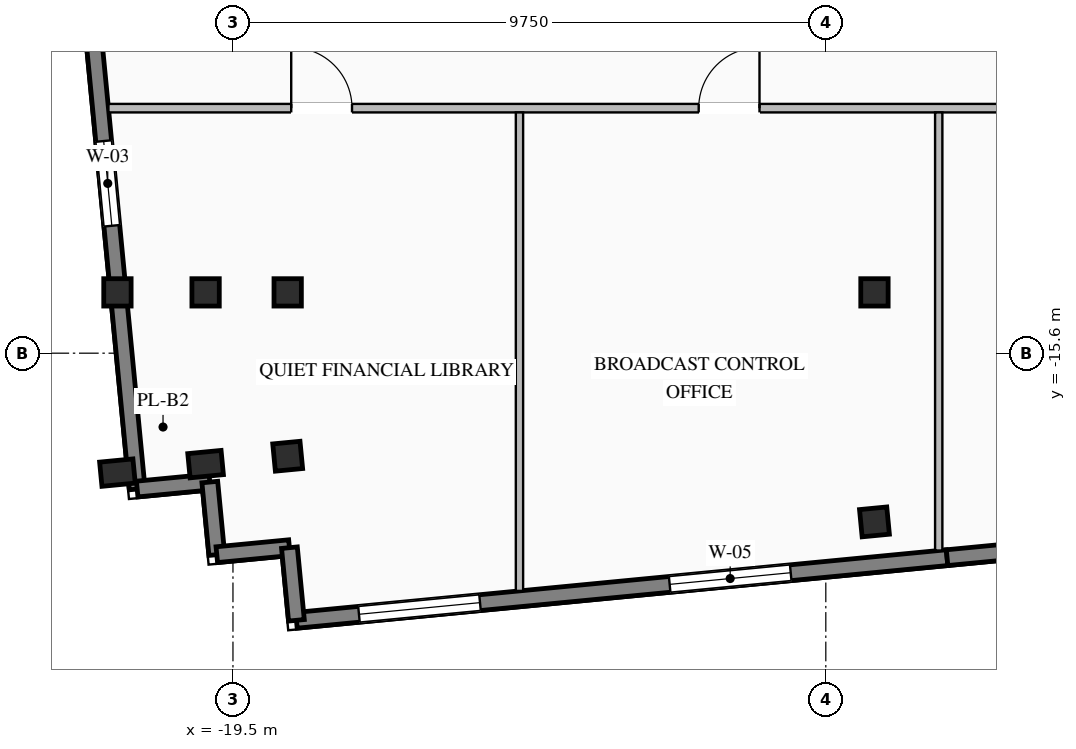
"""IFC4 building model, lengths in metres.
Left out: names, types, materials, properties, quantities, classifications, styles, units other than length and angle.
Written with IfcOpenShell. Run it as: python <this file> out.ifc"""

import sys

from ifc_helpers import new_model, si_unit, direction, frame, frame_2d, origin, origin_2d, place, context, subcontext, project, spatial, rectangle, i_section, extrude, element, fill, save


model = new_model("IFC4")
c1 = context("Model", 3, precision=1e-05, world=origin(), true_north=direction((0.0, 1.0)))
c2 = subcontext(c1, "Body", "Model", "MODEL_VIEW")
j1 = project(units=[si_unit("LENGTHUNIT", "METRE"), si_unit("PLANEANGLEUNIT", "RADIAN")], contexts=[c1])
p1 = place(None, origin())
s1 = spatial("IfcSite", under=j1, at=p1, CompositionType="ELEMENT")
p2 = place(p1, origin())
s2 = spatial("IfcBuilding", under=s1, at=p2, CompositionType="ELEMENT")
p3 = place(p2, frame((0.0, 0.0, 279.3)))
s3 = spatial("IfcBuildingStorey", under=s2, at=p3, CompositionType="ELEMENT", Elevation=279.3)
for number, where, z_axis, x_axis in (
    (1, (-21.4, -14.6, 0.0), (0.0, 0.0, 1.0), (1.0, 0.0, 0.0)),
    (2, (-19.95, -14.6, 0.0), (0.0, 0.0, 1.0), (1.0, 0.0, 0.0)),
    (3, (-18.6, -14.6, 0.0), (0.0, 0.0, 1.0), (1.0, 0.0, 0.0)),
    (4, (-8.95, -14.6, 0.0), (0.0, 0.0, 1.0), (1.0, 0.0, 0.0)),
    (5, (-18.6, -17.295, 0.0), (0.0, 0.0, 1.0), (0.995, 0.096, 0.0)),
    (6, (-8.95, -18.375, 0.0), (0.0, 0.0, 1.0), (0.995, 0.096, 0.0)),
):
    element("IfcColumn", number, at=place(p3, frame(where, z_axis=z_axis, x_axis=x_axis)), inside=s3, PredefinedType="COLUMN", context=c2, shape_type="SweptSolid", body=[
        extrude(i_section(OverallWidth=0.45, OverallDepth=0.45, WebThickness=0.022, FlangeThickness=0.032, at=origin_2d()), origin(), (0.0, 0.0, 1.0), 3.45),
    ])
for number, where, z_axis, x_axis in (
    (7, (-21.4, -17.564, 0.0), (0.0, 0.0, 1.0), (0.995, 0.096, 0.0)),
    (8, (-19.95, -17.425, 0.0), (0.0, 0.0, 1.0), (0.995, 0.096, 0.0)),
):
    element("IfcColumn", number, at=place(p3, frame(where, z_axis=z_axis, x_axis=x_axis)), inside=s3, PredefinedType="PILASTER", context=c2, shape_type="SweptSolid", body=[
        extrude(rectangle(XDim=0.55, YDim=0.4, at=origin_2d()), origin(), (0.0, 0.0, 1.0), 3.45),
    ])
p4 = place(p3, frame((-7.756, -18.963, 0.0), z_axis=(0.0, 0.0, 1.0), x_axis=(-0.995396745868, -0.095840066339, 0.0)))
e9 = element("IfcWall", 9, at=p4, inside=s3, PredefinedType="STANDARD", context=c2, shape_type="SweptSolid", body=[
    extrude(rectangle(XDim=10.75, YDim=0.26, at=frame_2d((5.375, 0.0))), origin(), (0.0, 0.0, 1.0), 3.25),
])
p5 = place(p4, frame((2.583, 0.0, 0.76)))
e10 = element("IfcOpeningElement", 10, at=p5, cuts=e9, PredefinedType="OPENING", context=c2, shape_type="SweptSolid", body=[
    extrude(rectangle(XDim=2.0, YDim=2.05, at=frame_2d((1.0, 1.025))), frame((0.0, 0.14, 0.0), z_axis=(0.0, -1.0, 0.0), x_axis=(1.0, 0.0, 0.0)), (0.0, 0.0, 1.0), 0.28),
])
p6 = place(p4, frame((7.717, 0.0, 0.76)))
e11 = element("IfcOpeningElement", 11, at=p6, cuts=e9, PredefinedType="OPENING", context=c2, shape_type="SweptSolid", body=[
    extrude(rectangle(XDim=2.0, YDim=2.05, at=frame_2d((1.0, 1.025))), frame((0.0, 0.14, 0.0), z_axis=(0.0, -1.0, 0.0), x_axis=(1.0, 0.0, 0.0)), (0.0, 0.0, 1.0), 0.28),
])
p7 = place(p3, frame((1.203, -18.101, 0.0), z_axis=(0.0, 0.0, 1.0), x_axis=(-0.995397043619, -0.095836973841, 0.0)))
e12 = element("IfcWall", 12, at=p7, inside=s3, PredefinedType="STANDARD", context=c2, shape_type="SweptSolid", body=[
    extrude(rectangle(XDim=9.0, YDim=0.26, at=frame_2d((4.5, 0.0))), origin(), (0.0, 0.0, 1.0), 3.25),
])
p8 = place(p7, frame((2.0, 0.0, 0.76)))
e13 = element("IfcOpeningElement", 13, at=p8, cuts=e12, PredefinedType="OPENING", context=c2, shape_type="SweptSolid", body=[
    extrude(rectangle(XDim=2.0, YDim=2.05, at=frame_2d((1.0, 1.025))), frame((0.0, 0.14, 0.0), z_axis=(0.0, -1.0, 0.0), x_axis=(1.0, 0.0, 0.0)), (0.0, 0.0, 1.0), 0.28),
])
p9 = place(p7, frame((5.0, 0.0, 0.76)))
e14 = element("IfcOpeningElement", 14, at=p9, cuts=e12, PredefinedType="OPENING", context=c2, shape_type="SweptSolid", body=[
    extrude(rectangle(XDim=2.0, YDim=2.05, at=frame_2d((1.0, 1.025))), frame((0.0, 0.14, 0.0), z_axis=(0.0, -1.0, 0.0), x_axis=(1.0, 0.0, 0.0)), (0.0, 0.0, 1.0), 0.28),
])
p10 = place(p3, frame((-21.075, -17.834, 0.0), z_axis=(0.0, 0.0, 1.0), x_axis=(-0.095852427869, 0.995395555582, 0.0)))
e15 = element("IfcWall", 15, at=p10, inside=s3, PredefinedType="STANDARD", context=c2, shape_type="SweptSolid", body=[
    extrude(rectangle(XDim=15.15, YDim=0.26, at=frame_2d((7.575, 0.0))), origin(), (0.0, 0.0, 1.0), 2.645),
])
p11 = place(p10, frame((4.35, 0.0, 0.535)))
e16 = element("IfcOpeningElement", 16, at=p11, cuts=e15, PredefinedType="OPENING", context=c2, shape_type="SweptSolid", body=[
    extrude(rectangle(XDim=1.4, YDim=1.95, at=frame_2d((0.7, 0.975))), frame((0.0, 0.14, 0.0), z_axis=(0.0, -1.0, 0.0), x_axis=(1.0, 0.0, 0.0)), (0.0, 0.0, 1.0), 0.28),
])
p12 = place(p10, frame((9.4, 0.0, 0.535)))
e17 = element("IfcOpeningElement", 17, at=p12, cuts=e15, PredefinedType="OPENING", context=c2, shape_type="SweptSolid", body=[
    extrude(rectangle(XDim=1.4, YDim=1.95, at=frame_2d((0.7, 0.975))), frame((0.0, 0.14, 0.0), z_axis=(0.0, -1.0, 0.0), x_axis=(1.0, 0.0, 0.0)), (0.0, 0.0, 1.0), 0.28),
])
p13 = place(p3, frame((-21.075, -17.834, 0.0), z_axis=(0.0, 0.0, 1.0), x_axis=(0.995397091755, 0.095836473879, 0.0)))
e18 = element("IfcWall", 18, at=p13, inside=s3, PredefinedType="STANDARD", context=c2, shape_type="SweptSolid", body=[
    extrude(rectangle(XDim=1.2, YDim=0.26, at=frame_2d((0.6, 0.0))), origin(), (0.0, 0.0, 1.0), 2.645),
])
for number, where, z_axis, x_axis in (
    (19, (-19.881, -17.719, 0.0), (0.0, 0.0, 1.0), (0.096, -0.995, 0.0)),
    (20, (-19.766, -18.914, 0.0), (0.0, 0.0, 1.0), (0.995, 0.096, 0.0)),
):
    element("IfcWall", number, at=place(p3, frame(where, z_axis=z_axis, x_axis=x_axis)), inside=s3, PredefinedType="STANDARD", context=c2, shape_type="SweptSolid", body=[
        extrude(rectangle(XDim=1.2, YDim=0.26, at=frame_2d((0.6, 0.0))), origin(), (0.0, 0.0, 1.0), 2.645),
    ])
p14 = place(p3, frame((-18.571, -18.799, 0.0), z_axis=(0.0, 0.0, 1.0), x_axis=(0.095836473879, -0.995397091755, 0.0)))
e21 = element("IfcWall", 21, at=p14, inside=s3, PredefinedType="STANDARD", context=c2, shape_type="SweptSolid", body=[
    extrude(rectangle(XDim=1.2, YDim=0.26, at=frame_2d((0.6, 0.0))), origin(), (0.0, 0.0, 1.0), 2.645),
])
p15 = place(p3, frame((-21.548, -11.57, 0.0), z_axis=(0.0, 0.0, 1.0), x_axis=(1.0, 0.0, 0.0)))
e22 = element("IfcWall", 22, at=p15, inside=s3, PredefinedType="STANDARD", context=c2, shape_type="SweptSolid", body=[
    extrude(rectangle(XDim=53.285, YDim=0.14, at=frame_2d((26.643, 0.0))), origin(), (0.0, 0.0, 1.0), 3.25),
])
p16 = place(p15, frame((21.638, 0.0, 0.0)))
e23 = element("IfcOpeningElement", 23, at=p16, cuts=e22, PredefinedType="OPENING", context=c2, shape_type="SweptSolid", body=[
    extrude(rectangle(XDim=0.92, YDim=2.08, at=frame_2d((0.46, 1.04))), frame((0.0, 0.08, 0.0), z_axis=(0.0, -1.0, 0.0), x_axis=(1.0, 0.0, 0.0)), (0.0, 0.0, 1.0), 0.16),
])
p17 = place(p15, frame((25.138, 0.0, 0.0)))
e24 = element("IfcOpeningElement", 24, at=p17, cuts=e22, PredefinedType="OPENING", context=c2, shape_type="SweptSolid", body=[
    extrude(rectangle(XDim=0.92, YDim=2.08, at=frame_2d((0.46, 1.04))), frame((0.0, 0.08, 0.0), z_axis=(0.0, -1.0, 0.0), x_axis=(1.0, 0.0, 0.0)), (0.0, 0.0, 1.0), 0.16),
])
p18 = place(p15, frame((27.988, 0.0, 0.0)))
e25 = element("IfcOpeningElement", 25, at=p18, cuts=e22, PredefinedType="OPENING", context=c2, shape_type="SweptSolid", body=[
    extrude(rectangle(XDim=0.92, YDim=2.08, at=frame_2d((0.46, 1.04))), frame((0.0, 0.08, 0.0), z_axis=(0.0, -1.0, 0.0), x_axis=(1.0, 0.0, 0.0)), (0.0, 0.0, 1.0), 0.16),
])
p19 = place(p15, frame((3.006, 0.0, 0.0)))
e26 = element("IfcOpeningElement", 26, at=p19, cuts=e22, PredefinedType="OPENING", context=c2, shape_type="SweptSolid", body=[
    extrude(rectangle(XDim=1.0, YDim=2.08, at=frame_2d((0.5, 1.04))), frame((0.0, 0.08, 0.0), z_axis=(0.0, -1.0, 0.0), x_axis=(1.0, 0.0, 0.0)), (0.0, 0.0, 1.0), 0.16),
])
p20 = place(p15, frame((9.708, 0.0, 0.0)))
e27 = element("IfcOpeningElement", 27, at=p20, cuts=e22, PredefinedType="OPENING", context=c2, shape_type="SweptSolid", body=[
    extrude(rectangle(XDim=1.0, YDim=2.08, at=frame_2d((0.5, 1.04))), frame((0.0, 0.08, 0.0), z_axis=(0.0, -1.0, 0.0), x_axis=(1.0, 0.0, 0.0)), (0.0, 0.0, 1.0), 0.16),
])
p21 = place(p15, frame((16.501, 0.0, 0.0)))
e28 = element("IfcOpeningElement", 28, at=p21, cuts=e22, PredefinedType="OPENING", context=c2, shape_type="SweptSolid", body=[
    extrude(rectangle(XDim=1.0, YDim=2.08, at=frame_2d((0.5, 1.04))), frame((0.0, 0.08, 0.0), z_axis=(0.0, -1.0, 0.0), x_axis=(1.0, 0.0, 0.0)), (0.0, 0.0, 1.0), 0.16),
])
p22 = place(p15, frame((32.97, 0.0, 0.0)))
e29 = element("IfcOpeningElement", 29, at=p22, cuts=e22, PredefinedType="OPENING", context=c2, shape_type="SweptSolid", body=[
    extrude(rectangle(XDim=1.0, YDim=2.08, at=frame_2d((0.5, 1.04))), frame((0.0, 0.08, 0.0), z_axis=(0.0, -1.0, 0.0), x_axis=(1.0, 0.0, 0.0)), (0.0, 0.0, 1.0), 0.16),
])
p23 = place(p15, frame((40.934, 0.0, 0.0)))
e30 = element("IfcOpeningElement", 30, at=p23, cuts=e22, PredefinedType="OPENING", context=c2, shape_type="SweptSolid", body=[
    extrude(rectangle(XDim=1.0, YDim=2.08, at=frame_2d((0.5, 1.04))), frame((0.0, 0.08, 0.0), z_axis=(0.0, -1.0, 0.0), x_axis=(1.0, 0.0, 0.0)), (0.0, 0.0, 1.0), 0.16),
])
p24 = place(p15, frame((48.754, 0.0, 0.0)))
e31 = element("IfcOpeningElement", 31, at=p24, cuts=e22, PredefinedType="OPENING", context=c2, shape_type="SweptSolid", body=[
    extrude(rectangle(XDim=1.0, YDim=2.08, at=frame_2d((0.5, 1.04))), frame((0.0, 0.08, 0.0), z_axis=(0.0, -1.0, 0.0), x_axis=(1.0, 0.0, 0.0)), (0.0, 0.0, 1.0), 0.16),
])
p25 = place(p3, frame((-14.788, -19.51, 0.0), z_axis=(0.0, 0.0, 1.0), x_axis=(0.0, 1.0, 0.0)))
e32 = element("IfcWall", 32, at=p25, inside=s3, PredefinedType="STANDARD", context=c2, shape_type="SweptSolid", body=[
    extrude(rectangle(XDim=7.87, YDim=0.12, at=frame_2d((3.935, 0.0))), origin(), (0.0, 0.0, 1.0), 3.25),
])
p26 = place(p3, frame((-7.893, -18.846, 0.0), z_axis=(0.0, 0.0, 1.0), x_axis=(0.0, 1.0, 0.0)))
e33 = element("IfcWall", 33, at=p26, inside=s3, PredefinedType="STANDARD", context=c2, shape_type="SweptSolid", body=[
    extrude(rectangle(XDim=7.206, YDim=0.12, at=frame_2d((3.603, 0.0))), origin(), (0.0, 0.0, 1.0), 3.25),
])
p27 = place(p5, origin())
e34 = element("IfcWindow", 34, at=p27, inside=s3, PartitioningType="DOUBLE_PANEL_VERTICAL", PredefinedType="WINDOW", context=c2, shape_type="SweptSolid", body=[
    extrude(rectangle(XDim=2.0, YDim=2.05, at=frame_2d((1.0, 1.025))), frame((0.0, 0.03, 0.0), z_axis=(0.0, -1.0, 0.0), x_axis=(1.0, 0.0, 0.0)), (0.0, 0.0, 1.0), 0.06),
])
fill(e10, e34)
p28 = place(p6, origin())
e35 = element("IfcWindow", 35, at=p28, inside=s3, PartitioningType="DOUBLE_PANEL_VERTICAL", PredefinedType="WINDOW", context=c2, shape_type="SweptSolid", body=[
    extrude(rectangle(XDim=2.0, YDim=2.05, at=frame_2d((1.0, 1.025))), frame((0.0, 0.03, 0.0), z_axis=(0.0, -1.0, 0.0), x_axis=(1.0, 0.0, 0.0)), (0.0, 0.0, 1.0), 0.06),
])
fill(e11, e35)
p29 = place(p11, origin())
e36 = element("IfcWindow", 36, at=p29, inside=s3, PartitioningType="SINGLE_PANEL", PredefinedType="WINDOW", context=c2, shape_type="SweptSolid", body=[
    extrude(rectangle(XDim=1.4, YDim=1.95, at=frame_2d((0.7, 0.975))), frame((0.0, 0.03, 0.0), z_axis=(0.0, -1.0, 0.0), x_axis=(1.0, 0.0, 0.0)), (0.0, 0.0, 1.0), 0.06),
])
fill(e16, e36)
p30 = place(p19, origin())
e37 = element("IfcDoor", 37, at=p30, inside=s3, OperationType="SINGLE_SWING_LEFT", PredefinedType="DOOR", context=c2, shape_type="SweptSolid", body=[
    extrude(rectangle(XDim=1.0, YDim=2.08, at=frame_2d((0.5, 1.04))), frame((0.0, 0.025, 0.0), z_axis=(0.0, -1.0, 0.0), x_axis=(1.0, 0.0, 0.0)), (0.0, 0.0, 1.0), 0.05),
])
fill(e26, e37)
p31 = place(p20, origin())
e38 = element("IfcDoor", 38, at=p31, inside=s3, OperationType="SINGLE_SWING_RIGHT", PredefinedType="DOOR", context=c2, shape_type="SweptSolid", body=[
    extrude(rectangle(XDim=1.0, YDim=2.08, at=frame_2d((0.5, 1.04))), frame((0.0, 0.025, 0.0), z_axis=(0.0, -1.0, 0.0), x_axis=(1.0, 0.0, 0.0)), (0.0, 0.0, 1.0), 0.05),
])
fill(e27, e38)
save(model, sys.argv[1])
